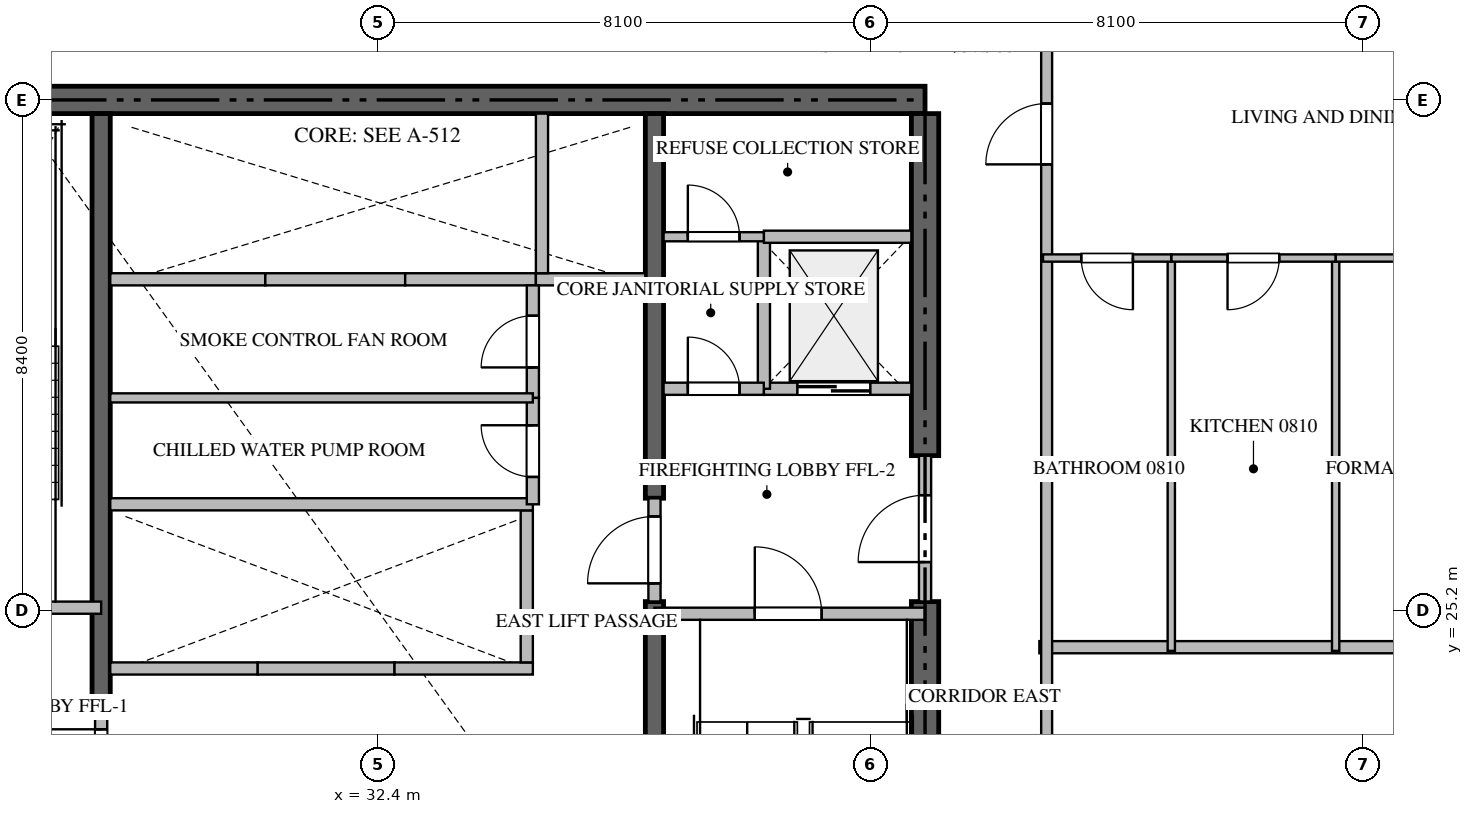
"""IFC4 building model, lengths in metres.
Left out: names, types, materials, properties, quantities, classifications, styles, units other than length and angle.
Written with IfcOpenShell. Run it as: python <this file> out.ifc"""

import sys

from ifc_helpers import new_model, si_unit, direction, frame, frame_2d, origin, place, context, subcontext, project, spatial, rectangle, extrude, source, transform, mapped, element, fill, save


model = new_model("IFC4")
c1 = context("Model", 3, precision=1e-05, world=origin(), true_north=direction((0.0, 1.0)))
c2 = subcontext(c1, "Body", "Model", "MODEL_VIEW")
j1 = project(units=[si_unit("LENGTHUNIT", "METRE"), si_unit("PLANEANGLEUNIT", "RADIAN")], contexts=[c1])
p1 = place(None, origin())
s1 = spatial("IfcSite", under=j1, at=p1, CompositionType="ELEMENT")
p2 = place(p1, origin())
s2 = spatial("IfcBuilding", under=s1, at=p2, CompositionType="ELEMENT")
p3 = place(p2, frame((0.0, 0.0, 37.95)))
s3 = spatial("IfcBuildingStorey", under=s2, at=p3, CompositionType="ELEMENT", Elevation=37.95)
p4 = place(p3, frame((41.4, 33.6, -0.26), z_axis=(0.0, 0.0, 1.0), x_axis=(-1.0, 0.0, 0.0)))
e1 = element("IfcWall", 1, at=p4, inside=s3, PredefinedType="SHEAR", context=c2, shape_type="SweptSolid", body=[
    extrude(rectangle(XDim=18.0, YDim=0.45, at=frame_2d((9.0, 0.0))), origin(), (0.0, 0.0, 1.0), 3.748),
])
p5 = place(p3, frame((41.4, 17.025, -0.26), z_axis=(0.0, 0.0, 1.0), x_axis=(0.0, 1.0, 0.0)))
e2 = element("IfcWall", 2, at=p5, inside=s3, PredefinedType="SHEAR", context=c2, shape_type="SweptSolid", body=[
    extrude(rectangle(XDim=8.325, YDim=0.45, at=frame_2d((4.163, 0.0))), origin(), (0.0, 0.0, 1.0), 3.748),
])
p6 = place(p3, frame((41.4, 27.75, -0.26), z_axis=(0.0, 0.0, 1.0), x_axis=(0.0, 1.0, 0.0)))
e3 = element("IfcWall", 3, at=p6, inside=s3, PredefinedType="SHEAR", context=c2, shape_type="SweptSolid", body=[
    extrude(rectangle(XDim=5.625, YDim=0.45, at=frame_2d((2.812, 0.0))), origin(), (0.0, 0.0, 1.0), 3.748),
])
p7 = place(p3, frame((27.85, 23.55, -0.26), z_axis=(0.0, 0.0, 1.0), x_axis=(0.0, 1.0, 0.0)))
e4 = element("IfcWall", 4, at=p7, inside=s3, PredefinedType="SHEAR", context=c2, shape_type="SweptSolid", body=[
    extrude(rectangle(XDim=9.825, YDim=0.3, at=frame_2d((4.913, 0.0))), origin(), (0.0, 0.0, 1.0), 3.748),
])
p8 = place(p3, frame((36.95, 17.025, -0.26), z_axis=(0.0, 0.0, 1.0), x_axis=(0.0, 1.0, 0.0)))
e5 = element("IfcWall", 5, at=p8, inside=s3, PredefinedType="SHEAR", context=c2, shape_type="SweptSolid", body=[
    extrude(rectangle(XDim=8.325, YDim=0.3, at=frame_2d((4.163, 0.0))), origin(), (0.0, 0.0, 1.0), 3.748),
])
p9 = place(p3, frame((36.95, 27.05, -0.26), z_axis=(0.0, 0.0, 1.0), x_axis=(0.0, 1.0, 0.0)))
e6 = element("IfcWall", 6, at=p9, inside=s3, PredefinedType="SHEAR", context=c2, shape_type="SweptSolid", body=[
    extrude(rectangle(XDim=6.325, YDim=0.3, at=frame_2d((3.163, 0.0))), origin(), (0.0, 0.0, 1.0), 3.748),
])
p10 = place(p3, frame((23.4, 25.25, 0.0), z_axis=(0.0, 0.0, 1.0), x_axis=(1.0, 0.0, 0.0)))
e7 = element("IfcWall", 7, at=p10, inside=s3, PredefinedType="STANDARD", context=c2, shape_type="SweptSolid", body=[
    extrude(rectangle(XDim=4.45, YDim=0.2, at=frame_2d((2.225, 0.0))), origin(), (0.0, 0.0, 1.0), 3.49),
])
p11 = place(p10, frame((1.65, 0.0, 0.0)))
e8 = element("IfcOpeningElement", 8, at=p11, cuts=e7, PredefinedType="OPENING", context=c2, shape_type="SweptSolid", body=[
    extrude(rectangle(XDim=1.1, YDim=2.15, at=frame_2d((0.55, 1.075))), frame((0.0, 0.11, 0.0), z_axis=(0.0, -1.0, 0.0), x_axis=(1.0, 0.0, 0.0)), (0.0, 0.0, 1.0), 0.22),
])
p12 = place(p3, frame((36.95, 25.15, 0.0), z_axis=(0.0, 0.0, 1.0), x_axis=(1.0, 0.0, 0.0)))
e9 = element("IfcWall", 9, at=p12, inside=s3, PredefinedType="STANDARD", context=c2, shape_type="SweptSolid", body=[
    extrude(rectangle(XDim=4.45, YDim=0.2, at=frame_2d((2.225, 0.0))), origin(), (0.0, 0.0, 1.0), 3.49),
])
p13 = place(p12, frame((1.65, 0.0, 0.0)))
e10 = element("IfcOpeningElement", 10, at=p13, cuts=e9, PredefinedType="OPENING", context=c2, shape_type="SweptSolid", body=[
    extrude(rectangle(XDim=1.1, YDim=2.15, at=frame_2d((0.55, 1.075))), frame((0.0, 0.11, 0.0), z_axis=(0.0, -1.0, 0.0), x_axis=(1.0, 0.0, 0.0)), (0.0, 0.0, 1.0), 0.22),
])
p14 = place(p3, frame((38.75, 28.85, 0.0), z_axis=(0.0, 0.0, 1.0), x_axis=(1.0, 0.0, 0.0)))
e11 = element("IfcWall", 11, at=p14, inside=s3, PredefinedType="STANDARD", context=c2, shape_type="SweptSolid", body=[
    extrude(rectangle(XDim=2.425, YDim=0.2, at=frame_2d((1.212, 0.0))), origin(), (0.0, 0.0, 1.0), 3.49),
])
p15 = place(p14, frame((0.55, 0.0, 0.0)))
e12 = element("IfcOpeningElement", 12, at=p15, cuts=e11, PredefinedType="OPENING", context=c2, shape_type="SweptSolid", body=[
    extrude(rectangle(XDim=1.2, YDim=2.2, at=frame_2d((0.6, 1.1))), frame((0.0, 0.11, 0.0), z_axis=(0.0, -1.0, 0.0), x_axis=(1.0, 0.0, 0.0)), (0.0, 0.0, 1.0), 0.22),
])
p16 = place(p3, frame((28.0, 24.25, 0.0), z_axis=(0.0, 0.0, 1.0), x_axis=(1.0, 0.0, 0.0)))
e13 = element("IfcWall", 13, at=p16, inside=s3, PredefinedType="STANDARD", context=c2, shape_type="SweptSolid", body=[
    extrude(rectangle(XDim=2.425, YDim=0.2, at=frame_2d((1.212, 0.0))), origin(), (0.0, 0.0, 1.0), 3.49),
])
p17 = place(p3, frame((30.425, 24.25, 0.0), z_axis=(0.0, 0.0, 1.0), x_axis=(1.0, 0.0, 0.0)))
e14 = element("IfcWall", 14, at=p17, inside=s3, PredefinedType="STANDARD", context=c2, shape_type="SweptSolid", body=[
    extrude(rectangle(XDim=2.25, YDim=0.2, at=frame_2d((1.125, 0.0))), origin(), (0.0, 0.0, 1.0), 3.49),
])
p18 = place(p3, frame((32.675, 24.25, 0.0), z_axis=(0.0, 0.0, 1.0), x_axis=(1.0, 0.0, 0.0)))
e15 = element("IfcWall", 15, at=p18, inside=s3, PredefinedType="STANDARD", context=c2, shape_type="SweptSolid", body=[
    extrude(rectangle(XDim=2.275, YDim=0.2, at=frame_2d((1.137, 0.0))), origin(), (0.0, 0.0, 1.0), 3.49),
])
p19 = place(p3, frame((34.85, 24.35, 0.0), z_axis=(0.0, 0.0, 1.0), x_axis=(0.0, 1.0, 0.0)))
e16 = element("IfcWall", 16, at=p19, inside=s3, PredefinedType="STANDARD", context=c2, shape_type="SweptSolid", body=[
    extrude(rectangle(XDim=2.5, YDim=0.2, at=frame_2d((1.25, 0.0))), origin(), (0.0, 0.0, 1.0), 3.49),
])
p20 = place(p3, frame((28.0, 30.65, 0.0), z_axis=(0.0, 0.0, 1.0), x_axis=(1.0, 0.0, 0.0)))
e17 = element("IfcWall", 17, at=p20, inside=s3, PredefinedType="STANDARD", context=c2, shape_type="SweptSolid", body=[
    extrude(rectangle(XDim=2.55, YDim=0.2, at=frame_2d((1.275, 0.0))), origin(), (0.0, 0.0, 1.0), 3.49),
])
p21 = place(p3, frame((30.55, 30.65, 0.0), z_axis=(0.0, 0.0, 1.0), x_axis=(1.0, 0.0, 0.0)))
e18 = element("IfcWall", 18, at=p21, inside=s3, PredefinedType="STANDARD", context=c2, shape_type="SweptSolid", body=[
    extrude(rectangle(XDim=2.3, YDim=0.2, at=frame_2d((1.15, 0.0))), origin(), (0.0, 0.0, 1.0), 3.49),
])
p22 = place(p3, frame((32.85, 30.65, 0.0), z_axis=(0.0, 0.0, 1.0), x_axis=(1.0, 0.0, 0.0)))
e19 = element("IfcWall", 19, at=p22, inside=s3, PredefinedType="STANDARD", context=c2, shape_type="SweptSolid", body=[
    extrude(rectangle(XDim=2.15, YDim=0.2, at=frame_2d((1.075, 0.0))), origin(), (0.0, 0.0, 1.0), 3.49),
])
p23 = place(p3, frame((35.0, 30.65, 0.0), z_axis=(0.0, 0.0, 1.0), x_axis=(1.0, 0.0, 0.0)))
e20 = element("IfcWall", 20, at=p23, inside=s3, PredefinedType="STANDARD", context=c2, shape_type="SweptSolid", body=[
    extrude(rectangle(XDim=1.8, YDim=0.2, at=frame_2d((0.9, 0.0))), origin(), (0.0, 0.0, 1.0), 3.49),
])
p24 = place(p3, frame((35.1, 30.75, 0.0), z_axis=(0.0, 0.0, 1.0), x_axis=(0.0, 1.0, 0.0)))
e21 = element("IfcWall", 21, at=p24, inside=s3, PredefinedType="STANDARD", context=c2, shape_type="SweptSolid", body=[
    extrude(rectangle(XDim=2.625, YDim=0.2, at=frame_2d((1.312, 0.0))), origin(), (0.0, 0.0, 1.0), 3.49),
])
p25 = place(p3, frame((38.75, 28.85, 0.0), z_axis=(0.0, 0.0, 1.0), x_axis=(0.0, 1.0, 0.0)))
e22 = element("IfcWall", 22, at=p25, inside=s3, PredefinedType="STANDARD", context=c2, shape_type="SweptSolid", body=[
    extrude(rectangle(XDim=2.5, YDim=0.2, at=frame_2d((1.25, 0.0))), origin(), (0.0, 0.0, 1.0), 3.49),
])
p26 = place(p3, frame((38.75, 31.35, 0.0), z_axis=(0.0, 0.0, 1.0), x_axis=(1.0, 0.0, 0.0)))
e23 = element("IfcWall", 23, at=p26, inside=s3, PredefinedType="STANDARD", context=c2, shape_type="SweptSolid", body=[
    extrude(rectangle(XDim=2.425, YDim=0.2, at=frame_2d((1.212, 0.0))), origin(), (0.0, 0.0, 1.0), 3.49),
])
p27 = place(p3, frame((37.1, 28.85, 0.0), z_axis=(0.0, 0.0, 1.0), x_axis=(1.0, 0.0, 0.0)))
e24 = element("IfcWall", 24, at=p27, inside=s3, PredefinedType="STANDARD", context=c2, shape_type="SweptSolid", body=[
    extrude(rectangle(XDim=1.648, YDim=0.2, at=frame_2d((0.824, 0.0))), origin(), (0.0, 0.0, 1.0), 3.49),
])
p28 = place(p27, frame((0.399, 0.0, 0.0)))
e25 = element("IfcOpeningElement", 25, at=p28, cuts=e24, PredefinedType="OPENING", context=c2, shape_type="SweptSolid", body=[
    extrude(rectangle(XDim=0.85, YDim=2.1, at=frame_2d((0.425, 1.05))), frame((0.0, 0.11, 0.0), z_axis=(0.0, -1.0, 0.0), x_axis=(1.0, 0.0, 0.0)), (0.0, 0.0, 1.0), 0.22),
])
p29 = place(p3, frame((41.4, 25.352, 0.0), z_axis=(0.0, 0.0, 1.0), x_axis=(0.0, 1.0, 0.0)))
e26 = element("IfcWall", 26, at=p29, inside=s3, PredefinedType="STANDARD", context=c2, shape_type="SweptSolid", body=[
    extrude(rectangle(XDim=2.396, YDim=0.2, at=frame_2d((1.198, 0.0))), origin(), (0.0, 0.0, 1.0), 3.49),
])
p30 = place(p29, frame((0.648, 0.0, 0.0)))
e27 = element("IfcOpeningElement", 27, at=p30, cuts=e26, PredefinedType="OPENING", context=c2, shape_type="SweptSolid", body=[
    extrude(rectangle(XDim=1.1, YDim=2.15, at=frame_2d((0.55, 1.075))), frame((0.0, 0.11, 0.0), z_axis=(0.0, -1.0, 0.0), x_axis=(1.0, 0.0, 0.0)), (0.0, 0.0, 1.0), 0.22),
])
p31 = place(p3, frame((27.85, 21.852, 0.0), z_axis=(0.0, 0.0, 1.0), x_axis=(0.0, 1.0, 0.0)))
e28 = element("IfcWall", 28, at=p31, inside=s3, PredefinedType="STANDARD", context=c2, shape_type="SweptSolid", body=[
    extrude(rectangle(XDim=1.696, YDim=0.2, at=frame_2d((0.848, 0.0))), origin(), (0.0, 0.0, 1.0), 3.49),
])
p32 = place(p31, frame((0.298, 0.0, 0.0)))
e29 = element("IfcOpeningElement", 29, at=p32, cuts=e28, PredefinedType="OPENING", context=c2, shape_type="SweptSolid", body=[
    extrude(rectangle(XDim=1.1, YDim=2.15, at=frame_2d((0.55, 1.075))), frame((0.0, 0.11, 0.0), z_axis=(0.0, -1.0, 0.0), x_axis=(1.0, 0.0, 0.0)), (0.0, 0.0, 1.0), 0.22),
])
p33 = place(p3, frame((36.95, 25.352, 0.0), z_axis=(0.0, 0.0, 1.0), x_axis=(0.0, 1.0, 0.0)))
e30 = element("IfcWall", 30, at=p33, inside=s3, PredefinedType="STANDARD", context=c2, shape_type="SweptSolid", body=[
    extrude(rectangle(XDim=1.696, YDim=0.2, at=frame_2d((0.848, 0.0))), origin(), (0.0, 0.0, 1.0), 3.49),
])
p34 = place(p33, frame((0.298, 0.0, 0.0)))
e31 = element("IfcOpeningElement", 31, at=p34, cuts=e30, PredefinedType="OPENING", context=c2, shape_type="SweptSolid", body=[
    extrude(rectangle(XDim=1.1, YDim=2.15, at=frame_2d((0.55, 1.075))), frame((0.0, 0.11, 0.0), z_axis=(0.0, -1.0, 0.0), x_axis=(1.0, 0.0, 0.0)), (0.0, 0.0, 1.0), 0.22),
])
p35 = place(p3, frame((28.0, 26.95, 0.0), z_axis=(0.0, 0.0, 1.0), x_axis=(1.0, 0.0, 0.0)))
e32 = element("IfcWall", 32, at=p35, inside=s3, PredefinedType="STANDARD", context=c2, shape_type="SweptSolid", body=[
    extrude(rectangle(XDim=6.95, YDim=0.2, at=frame_2d((3.475, 0.0))), origin(), (0.0, 0.0, 1.0), 3.49),
])
p36 = place(p3, frame((37.1, 31.35, 0.0), z_axis=(0.0, 0.0, 1.0), x_axis=(1.0, 0.0, 0.0)))
e33 = element("IfcWall", 33, at=p36, inside=s3, PredefinedType="PARTITIONING", context=c2, shape_type="SweptSolid", body=[
    extrude(rectangle(XDim=1.648, YDim=0.15, at=frame_2d((0.824, 0.0))), origin(), (0.0, 0.0, 1.0), 3.49),
])
p37 = place(p36, frame((0.399, 0.0, 0.0)))
e34 = element("IfcOpeningElement", 34, at=p37, cuts=e33, PredefinedType="OPENING", context=c2, shape_type="SweptSolid", body=[
    extrude(rectangle(XDim=0.85, YDim=2.1, at=frame_2d((0.425, 1.05))), frame((0.0, 0.085, 0.0), z_axis=(0.0, -1.0, 0.0), x_axis=(1.0, 0.0, 0.0)), (0.0, 0.0, 1.0), 0.17),
])
p38 = place(p3, frame((34.95, 26.95, 0.0), z_axis=(0.0, 0.0, 1.0), x_axis=(0.0, 1.0, 0.0)))
e35 = element("IfcWall", 35, at=p38, inside=s3, PredefinedType="STANDARD", context=c2, shape_type="SweptSolid", body=[
    extrude(rectangle(XDim=1.75, YDim=0.2, at=frame_2d((0.875, 0.0))), origin(), (0.0, 0.0, 1.0), 3.49),
])
p39 = place(p38, frame((0.45, 0.0, 0.0)))
e36 = element("IfcOpeningElement", 36, at=p39, cuts=e35, PredefinedType="OPENING", context=c2, shape_type="SweptSolid", body=[
    extrude(rectangle(XDim=0.85, YDim=2.1, at=frame_2d((0.425, 1.05))), frame((0.0, 0.11, 0.0), z_axis=(0.0, -1.0, 0.0), x_axis=(1.0, 0.0, 0.0)), (0.0, 0.0, 1.0), 0.22),
])
p40 = place(p3, frame((34.95, 28.702, 0.0), z_axis=(0.0, 0.0, 1.0), x_axis=(0.0, 1.0, 0.0)))
e37 = element("IfcWall", 37, at=p40, inside=s3, PredefinedType="STANDARD", context=c2, shape_type="SweptSolid", body=[
    extrude(rectangle(XDim=1.848, YDim=0.2, at=frame_2d((0.924, 0.0))), origin(), (0.0, 0.0, 1.0), 3.49),
])
p41 = place(p40, frame((0.499, 0.0, 0.0)))
e38 = element("IfcOpeningElement", 38, at=p41, cuts=e37, PredefinedType="OPENING", context=c2, shape_type="SweptSolid", body=[
    extrude(rectangle(XDim=0.85, YDim=2.1, at=frame_2d((0.425, 1.05))), frame((0.0, 0.11, 0.0), z_axis=(0.0, -1.0, 0.0), x_axis=(1.0, 0.0, 0.0)), (0.0, 0.0, 1.0), 0.22),
])
p42 = place(p3, frame((28.0, 28.7, 0.0), z_axis=(0.0, 0.0, 1.0), x_axis=(1.0, 0.0, 0.0)))
e39 = element("IfcWall", 39, at=p42, inside=s3, PredefinedType="PARTITIONING", context=c2, shape_type="SweptSolid", body=[
    extrude(rectangle(XDim=6.95, YDim=0.15, at=frame_2d((3.475, 0.0))), origin(), (0.0, 0.0, 1.0), 3.49),
])
p43 = place(p3, frame((43.28, 24.6, 0.0), z_axis=(0.0, 0.0, 1.0), x_axis=(1.0, 0.0, 0.0)))
e40 = element("IfcWall", 40, at=p43, inside=s3, PredefinedType="PARTITIONING", context=c2, shape_type="SweptSolid", body=[
    extrude(rectangle(XDim=15.438, YDim=0.2, at=frame_2d((7.719, 0.0))), origin(), (0.0, 0.0, 1.0), 3.49),
])
p44 = place(p3, frame((43.4, 14.9, 0.0), z_axis=(0.0, 0.0, 1.0), x_axis=(0.0, 1.0, 0.0)))
e41 = element("IfcWall", 41, at=p44, inside=s3, PredefinedType="PARTITIONING", context=c2, shape_type="SweptSolid", body=[
    extrude(rectangle(XDim=20.6, YDim=0.18, at=frame_2d((10.3, 0.0))), origin(), (0.0, 0.0, 1.0), 3.49),
])
p45 = place(p44, frame((5.723, 0.0, 0.0)))
e42 = element("IfcOpeningElement", 42, at=p45, cuts=e41, PredefinedType="OPENING", context=c2, shape_type="SweptSolid", body=[
    extrude(rectangle(XDim=1.0, YDim=2.15, at=frame_2d((0.5, 1.075))), frame((0.0, 0.1, 0.0), z_axis=(0.0, -1.0, 0.0), x_axis=(1.0, 0.0, 0.0)), (0.0, 0.0, 1.0), 0.2),
])
p46 = place(p44, frame((17.64, 0.0, 0.0)))
e43 = element("IfcOpeningElement", 43, at=p46, cuts=e41, PredefinedType="OPENING", context=c2, shape_type="SweptSolid", body=[
    extrude(rectangle(XDim=1.0, YDim=2.15, at=frame_2d((0.5, 1.075))), frame((0.0, 0.1, 0.0), z_axis=(0.0, -1.0, 0.0), x_axis=(1.0, 0.0, 0.0)), (0.0, 0.0, 1.0), 0.2),
])
for number, where, z_axis, x_axis in (
    (44, (48.153, 24.54, 0.0), (0.0, 0.0, 1.0), (0.0, 1.0, 0.0)),
    (45, (45.45, 24.54, 0.0), (0.0, 0.0, 1.0), (0.0, 1.0, 0.0)),
):
    element("IfcWall", number, at=place(p3, frame(where, z_axis=z_axis, x_axis=x_axis)), inside=s3, PredefinedType="PARTITIONING", context=c2, shape_type="SweptSolid", body=[
        extrude(rectangle(XDim=6.46, YDim=0.12, at=frame_2d((3.23, 0.0))), origin(), (0.0, 0.0, 1.0), 3.49),
    ])
p47 = place(p3, frame((52.086, 31.0, 0.0), z_axis=(0.0, 0.0, 1.0), x_axis=(-1.0, 0.0, 0.0)))
e46 = element("IfcWall", 46, at=p47, inside=s3, PredefinedType="PARTITIONING", context=c2, shape_type="SweptSolid", body=[
    extrude(rectangle(XDim=3.933, YDim=0.12, at=frame_2d((1.966, 0.0))), origin(), (0.0, 0.0, 1.0), 3.49),
])
p48 = place(p47, frame((1.541, 0.0, 0.0)))
e47 = element("IfcOpeningElement", 47, at=p48, cuts=e46, PredefinedType="OPENING", context=c2, shape_type="SweptSolid", body=[
    extrude(rectangle(XDim=0.85, YDim=2.1, at=frame_2d((0.425, 1.05))), frame((0.0, 0.07, 0.0), z_axis=(0.0, -1.0, 0.0), x_axis=(1.0, 0.0, 0.0)), (0.0, 0.0, 1.0), 0.14),
])
p49 = place(p3, frame((48.151, 31.0, 0.0), z_axis=(0.0, 0.0, 1.0), x_axis=(-1.0, 0.0, 0.0)))
e48 = element("IfcWall", 48, at=p49, inside=s3, PredefinedType="PARTITIONING", context=c2, shape_type="SweptSolid", body=[
    extrude(rectangle(XDim=2.701, YDim=0.12, at=frame_2d((1.351, 0.0))), origin(), (0.0, 0.0, 1.0), 3.49),
])
p50 = place(p49, frame((0.926, 0.0, 0.0)))
e49 = element("IfcOpeningElement", 49, at=p50, cuts=e48, PredefinedType="OPENING", context=c2, shape_type="SweptSolid", body=[
    extrude(rectangle(XDim=0.85, YDim=2.1, at=frame_2d((0.425, 1.05))), frame((0.0, 0.07, 0.0), z_axis=(0.0, -1.0, 0.0), x_axis=(1.0, 0.0, 0.0)), (0.0, 0.0, 1.0), 0.14),
])
p51 = place(p3, frame((45.448, 31.0, 0.0), z_axis=(0.0, 0.0, 1.0), x_axis=(-1.0, 0.0, 0.0)))
e50 = element("IfcWall", 50, at=p51, inside=s3, PredefinedType="PARTITIONING", context=c2, shape_type="SweptSolid", body=[
    extrude(rectangle(XDim=2.108, YDim=0.12, at=frame_2d((1.054, 0.0))), origin(), (0.0, 0.0, 1.0), 3.49),
])
p52 = place(p51, frame((0.629, 0.0, 0.0)))
e51 = element("IfcOpeningElement", 51, at=p52, cuts=e50, PredefinedType="OPENING", context=c2, shape_type="SweptSolid", body=[
    extrude(rectangle(XDim=0.85, YDim=2.1, at=frame_2d((0.425, 1.05))), frame((0.0, 0.07, 0.0), z_axis=(0.0, -1.0, 0.0), x_axis=(1.0, 0.0, 0.0)), (0.0, 0.0, 1.0), 0.14),
])
m1 = source(origin(), c2, "Body", "SweptSolid", [
    extrude(rectangle(XDim=1.1, YDim=2.15, at=frame_2d((0.55, 1.075))), frame((0.0, 0.025, 0.0), z_axis=(0.0, -1.0, 0.0), x_axis=(1.0, 0.0, 0.0)), (0.0, 0.0, 1.0), 0.05),
])
p53 = place(p13, origin())
e52 = element("IfcDoor", 52, at=p53, inside=s3, OperationType="SINGLE_SWING_LEFT", PredefinedType="DOOR", context=c2, shape_type="MappedRepresentation", body=[
    mapped(m1, transform((0.0, 0.0, 0.0), scale=1.0)),
])
fill(e10, e52)
m2 = source(origin(), c2, "Body", "SweptSolid", [
    extrude(rectangle(XDim=1.2, YDim=2.2, at=frame_2d((0.6, 1.1))), frame((0.0, 0.025, 0.0), z_axis=(0.0, -1.0, 0.0), x_axis=(1.0, 0.0, 0.0)), (0.0, 0.0, 1.0), 0.05),
])
p54 = place(p15, origin())
e53 = element("IfcDoor", 53, at=p54, inside=s3, OperationType="DOUBLE_DOOR_SLIDING", PredefinedType="DOOR", context=c2, shape_type="MappedRepresentation", body=[
    mapped(m2, transform((0.0, 0.0, 0.0), scale=1.0)),
])
fill(e12, e53)
m3 = source(origin(), c2, "Body", "SweptSolid", [
    extrude(rectangle(XDim=0.85, YDim=2.1, at=frame_2d((0.425, 1.05))), frame((0.0, 0.025, 0.0), z_axis=(0.0, -1.0, 0.0), x_axis=(1.0, 0.0, 0.0)), (0.0, 0.0, 1.0), 0.05),
])
p55 = place(p28, origin())
e54 = element("IfcDoor", 54, at=p55, inside=s3, OperationType="SINGLE_SWING_LEFT", PredefinedType="DOOR", context=c2, shape_type="MappedRepresentation", body=[
    mapped(m3, transform((0.0, 0.0, 0.0), scale=1.0)),
])
fill(e25, e54)
p56 = place(p30, origin())
e55 = element("IfcDoor", 55, at=p56, inside=s3, OperationType="SINGLE_SWING_LEFT", PredefinedType="DOOR", context=c2, shape_type="MappedRepresentation", body=[
    mapped(m1, transform((0.0, 0.0, 0.0), scale=1.0)),
])
fill(e27, e55)
p57 = place(p32, origin())
e56 = element("IfcDoor", 56, at=p57, inside=s3, OperationType="SINGLE_SWING_RIGHT", PredefinedType="DOOR", context=c2, shape_type="MappedRepresentation", body=[
    mapped(m1, transform((0.0, 0.0, 0.0), scale=1.0)),
])
fill(e29, e56)
p58 = place(p34, origin())
e57 = element("IfcDoor", 57, at=p58, inside=s3, OperationType="SINGLE_SWING_LEFT", PredefinedType="DOOR", context=c2, shape_type="MappedRepresentation", body=[
    mapped(m1, transform((0.0, 0.0, 0.0), scale=1.0)),
])
fill(e31, e57)
p59 = place(p37, origin())
e58 = element("IfcDoor", 58, at=p59, inside=s3, OperationType="SINGLE_SWING_LEFT", PredefinedType="DOOR", context=c2, shape_type="MappedRepresentation", body=[
    mapped(m3, transform((0.0, 0.0, 0.0), scale=1.0)),
])
fill(e34, e58)
p60 = place(p39, origin())
e59 = element("IfcDoor", 59, at=p60, inside=s3, OperationType="SINGLE_SWING_RIGHT", PredefinedType="DOOR", context=c2, shape_type="MappedRepresentation", body=[
    mapped(m3, transform((0.0, 0.0, 0.0), scale=1.0)),
])
fill(e36, e59)
p61 = place(p41, origin())
e60 = element("IfcDoor", 60, at=p61, inside=s3, OperationType="SINGLE_SWING_LEFT", PredefinedType="DOOR", context=c2, shape_type="MappedRepresentation", body=[
    mapped(m3, transform((0.0, 0.0, 0.0), scale=1.0)),
])
fill(e38, e60)
m4 = source(origin(), c2, "Body", "SweptSolid", [
    extrude(rectangle(XDim=1.0, YDim=2.15, at=frame_2d((0.5, 1.075))), frame((0.0, 0.025, 0.0), z_axis=(0.0, -1.0, 0.0), x_axis=(1.0, 0.0, 0.0)), (0.0, 0.0, 1.0), 0.05),
])
p62 = place(p46, origin())
e61 = element("IfcDoor", 61, at=p62, inside=s3, OperationType="SINGLE_SWING_LEFT", PredefinedType="DOOR", context=c2, shape_type="MappedRepresentation", body=[
    mapped(m4, transform((0.0, 0.0, 0.0), scale=1.0)),
])
fill(e43, e61)
p63 = place(p50, origin())
e62 = element("IfcDoor", 62, at=p63, inside=s3, OperationType="SINGLE_SWING_RIGHT", PredefinedType="DOOR", context=c2, shape_type="MappedRepresentation", body=[
    mapped(m3, transform((0.0, 0.0, 0.0), scale=1.0)),
])
fill(e49, e62)
p64 = place(p52, origin())
e63 = element("IfcDoor", 63, at=p64, inside=s3, OperationType="SINGLE_SWING_LEFT", PredefinedType="DOOR", context=c2, shape_type="MappedRepresentation", body=[
    mapped(m3, transform((0.0, 0.0, 0.0), scale=1.0)),
])
fill(e51, e63)
save(model, sys.argv[1])
